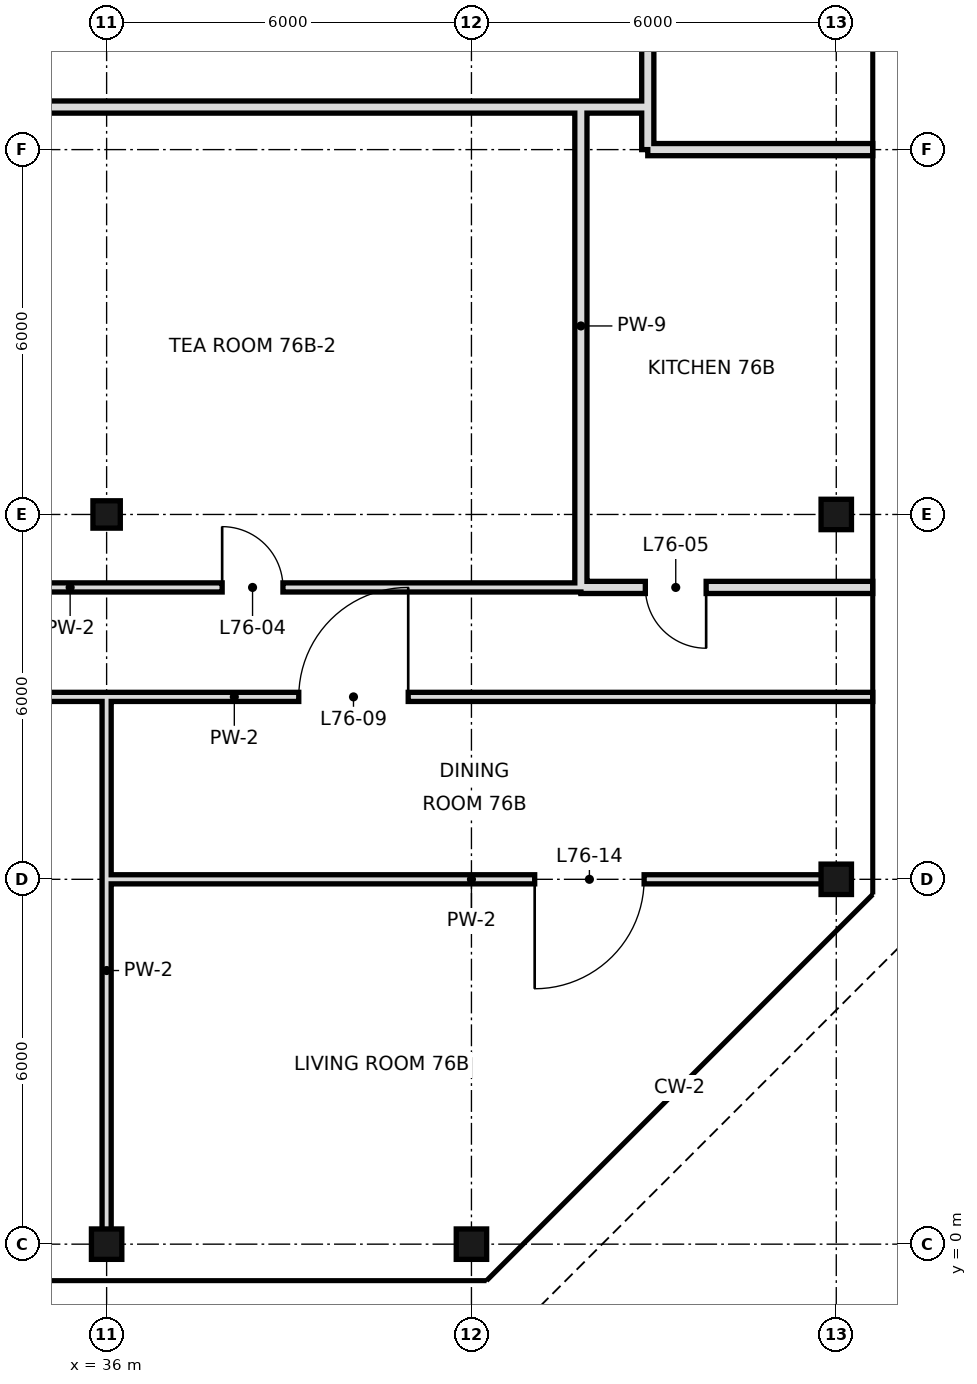
"""IFC4 building model, lengths in metres.
Left out: names, types, materials, properties, quantities, classifications, styles, units other than length and angle.
Written with IfcOpenShell. Run it as: python <this file> out.ifc"""

import sys

from ifc_helpers import new_model, si_unit, direction, frame, frame_2d, origin, origin_2d, place, context, subcontext, project, spatial, rectangle, hollow_rectangle, extrude, element, fill, save


model = new_model("IFC4")
c1 = context("Model", 3, precision=1e-05, world=origin(), true_north=direction((0.0, 1.0)))
c2 = subcontext(c1, "Body", "Model", "MODEL_VIEW")
j1 = project(units=[si_unit("LENGTHUNIT", "METRE"), si_unit("PLANEANGLEUNIT", "RADIAN")], contexts=[c1])
p1 = place(None, origin())
s1 = spatial("IfcSite", under=j1, at=p1, CompositionType="ELEMENT")
p2 = place(p1, origin())
s2 = spatial("IfcBuilding", under=s1, at=p2, CompositionType="ELEMENT")
p3 = place(p2, frame((0.0, 0.0, 319.6)))
s3 = spatial("IfcBuildingStorey", under=s2, at=p3, CompositionType="ELEMENT", Elevation=319.6)
p4 = place(p3, frame((36.0, 0.0, 0.0), z_axis=(0.0, 0.0, 1.0), x_axis=(1.0, 0.0, 0.0)))
e1 = element("IfcColumn", 1, at=p4, inside=s3, PredefinedType="COLUMN", context=c2, shape_type="SweptSolid", body=[
    extrude(hollow_rectangle(XDim=0.5, YDim=0.5, WallThickness=0.025, at=origin_2d()), origin(), (0.0, 0.0, 1.0), 3.6),
])
p5 = place(p3, frame((36.0, 12.0, 0.0), z_axis=(0.0, 0.0, 1.0), x_axis=(1.0, 0.0, 0.0)))
e2 = element("IfcColumn", 2, at=p5, inside=s3, PredefinedType="COLUMN", context=c2, shape_type="SweptSolid", body=[
    extrude(hollow_rectangle(XDim=0.45, YDim=0.45, WallThickness=0.022, at=origin_2d()), origin(), (0.0, 0.0, 1.0), 3.6),
])
for number, where, z_axis, x_axis in (
    (3, (42.0, 0.0, 0.0), (0.0, 0.0, 1.0), (1.0, 0.0, 0.0)),
    (4, (48.0, 6.0, 0.0), (0.0, 0.0, 1.0), (1.0, 0.0, 0.0)),
    (5, (48.0, 12.0, 0.0), (0.0, 0.0, 1.0), (1.0, 0.0, 0.0)),
):
    element("IfcColumn", number, at=place(p3, frame(where, z_axis=z_axis, x_axis=x_axis)), inside=s3, PredefinedType="COLUMN", context=c2, shape_type="SweptSolid", body=[
        extrude(hollow_rectangle(XDim=0.5, YDim=0.5, WallThickness=0.025, at=origin_2d()), origin(), (0.0, 0.0, 1.0), 3.6),
    ])
p6 = place(p3, frame((36.0, 0.0, 0.0), z_axis=(0.0, 0.0, 1.0), x_axis=(0.0, 1.0, 0.0)))
e6 = element("IfcWall", 6, at=p6, inside=s3, PredefinedType="PARTITIONING", context=c2, shape_type="SweptSolid", body=[
    extrude(rectangle(XDim=9.0, YDim=0.15, at=frame_2d((4.5, 0.0))), origin(), (0.0, 0.0, 1.0), 2.72),
])
p7 = place(p3, frame((43.8, 10.8, 0.0), z_axis=(0.0, 0.0, 1.0), x_axis=(0.0, 1.0, 0.0)))
e7 = element("IfcWall", 7, at=p7, inside=s3, PredefinedType="SOLIDWALL", context=c2, shape_type="SweptSolid", body=[
    extrude(rectangle(XDim=7.9, YDim=0.2, at=frame_2d((3.95, 0.0))), origin(), (0.0, 0.0, 1.0), 2.72),
])
p8 = place(p3, frame((44.9, 18.7, 0.0), z_axis=(0.0, 0.0, 1.0), x_axis=(0.0, 1.0, 0.0)))
e8 = element("IfcWall", 8, at=p8, inside=s3, PredefinedType="SOLIDWALL", context=c2, shape_type="SweptSolid", body=[
    extrude(rectangle(XDim=27.249, YDim=0.2, at=frame_2d((13.625, 0.0))), origin(), (0.0, 0.0, 1.0), 2.97),
])
p9 = place(p8, frame((7.66, 0.0, 0.0)))
e9 = element("IfcOpeningElement", 9, at=p9, cuts=e8, PredefinedType="OPENING", context=c2, shape_type="SweptSolid", body=[
    extrude(rectangle(XDim=1.2, YDim=2.4, at=frame_2d((0.6, 1.2))), frame((0.0, 0.11, 0.0), z_axis=(0.0, -1.0, 0.0), x_axis=(1.0, 0.0, 0.0)), (0.0, 0.0, 1.0), 0.22),
])
p10 = place(p3, frame((44.9, 18.0, 0.0), z_axis=(0.0, 0.0, 1.0), x_axis=(0.0, 1.0, 0.0)))
e10 = element("IfcWall", 10, at=p10, inside=s3, PredefinedType="SOLIDWALL", context=c2, shape_type="SweptSolid", body=[
    extrude(rectangle(XDim=0.7, YDim=0.2, at=frame_2d((0.35, 0.0))), origin(), (0.0, 0.0, 1.0), 2.97),
])
p11 = place(p3, frame((43.8, 10.8, 0.0), z_axis=(0.0, 0.0, 1.0), x_axis=(1.0, 0.0, 0.0)))
e11 = element("IfcWall", 11, at=p11, inside=s3, PredefinedType="SOLIDWALL", context=c2, shape_type="SweptSolid", body=[
    extrude(rectangle(XDim=4.8, YDim=0.2, at=frame_2d((2.4, 0.0))), origin(), (0.0, 0.0, 1.0), 2.97),
])
p12 = place(p11, frame((1.06, 0.0, 0.0)))
e12 = element("IfcOpeningElement", 12, at=p12, cuts=e11, PredefinedType="OPENING", context=c2, shape_type="SweptSolid", body=[
    extrude(rectangle(XDim=1.0, YDim=2.4, at=frame_2d((0.5, 1.2))), frame((0.0, 0.11, 0.0), z_axis=(0.0, -1.0, 0.0), x_axis=(1.0, 0.0, 0.0)), (0.0, 0.0, 1.0), 0.22),
])
p13 = place(p3, frame((27.0, 10.8, 0.0), z_axis=(0.0, 0.0, 1.0), x_axis=(1.0, 0.0, 0.0)))
e13 = element("IfcWall", 13, at=p13, inside=s3, PredefinedType="PARTITIONING", context=c2, shape_type="SweptSolid", body=[
    extrude(rectangle(XDim=16.8, YDim=0.15, at=frame_2d((8.4, 0.0))), origin(), (0.0, 0.0, 1.0), 3.42),
])
p14 = place(p13, frame((1.6, 0.0, 0.0)))
e14 = element("IfcOpeningElement", 14, at=p14, cuts=e13, PredefinedType="OPENING", context=c2, shape_type="SweptSolid", body=[
    extrude(rectangle(XDim=1.0, YDim=2.4, at=frame_2d((0.5, 1.2))), frame((0.0, 0.085, 0.0), z_axis=(0.0, -1.0, 0.0), x_axis=(1.0, 0.0, 0.0)), (0.0, 0.0, 1.0), 0.17),
])
p15 = place(p13, frame((10.9, 0.0, 0.0)))
e15 = element("IfcOpeningElement", 15, at=p15, cuts=e13, PredefinedType="OPENING", context=c2, shape_type="SweptSolid", body=[
    extrude(rectangle(XDim=1.0, YDim=2.4, at=frame_2d((0.5, 1.2))), frame((0.0, 0.085, 0.0), z_axis=(0.0, -1.0, 0.0), x_axis=(1.0, 0.0, 0.0)), (0.0, 0.0, 1.0), 0.17),
])
p16 = place(p3, frame((44.9, 18.0, 0.0), z_axis=(0.0, 0.0, 1.0), x_axis=(1.0, 0.0, 0.0)))
e16 = element("IfcWall", 16, at=p16, inside=s3, PredefinedType="SOLIDWALL", context=c2, shape_type="SweptSolid", body=[
    extrude(rectangle(XDim=3.7, YDim=0.2, at=frame_2d((1.85, 0.0))), origin(), (0.0, 0.0, 1.0), 2.72),
])
p17 = place(p3, frame((3.1, 18.7, 0.0), z_axis=(0.0, 0.0, 1.0), x_axis=(1.0, 0.0, 0.0)))
e17 = element("IfcWall", 17, at=p17, inside=s3, PredefinedType="SOLIDWALL", context=c2, shape_type="SweptSolid", body=[
    extrude(rectangle(XDim=40.7, YDim=0.2, at=frame_2d((20.35, 0.0))), origin(), (0.0, 0.0, 1.0), 2.72),
])
p18 = place(p17, frame((25.44, 0.0, 0.0)))
e18 = element("IfcOpeningElement", 18, at=p18, cuts=e17, PredefinedType="OPENING", context=c2, shape_type="SweptSolid", body=[
    extrude(rectangle(XDim=1.2, YDim=2.4, at=frame_2d((0.6, 1.2))), frame((0.0, 0.11, 0.0), z_axis=(0.0, -1.0, 0.0), x_axis=(1.0, 0.0, 0.0)), (0.0, 0.0, 1.0), 0.22),
])
p19 = place(p17, frame((6.55, 0.0, 0.0)))
e19 = element("IfcOpeningElement", 19, at=p19, cuts=e17, PredefinedType="OPENING", context=c2, shape_type="SweptSolid", body=[
    extrude(rectangle(XDim=1.8, YDim=2.4, at=frame_2d((0.9, 1.2))), frame((0.0, 0.11, 0.0), z_axis=(0.0, -1.0, 0.0), x_axis=(1.0, 0.0, 0.0)), (0.0, 0.0, 1.0), 0.22),
])
p20 = place(p3, frame((43.8, 18.7, 0.0), z_axis=(0.0, 0.0, 1.0), x_axis=(1.0, 0.0, 0.0)))
e20 = element("IfcWall", 20, at=p20, inside=s3, PredefinedType="SOLIDWALL", context=c2, shape_type="SweptSolid", body=[
    extrude(rectangle(XDim=1.1, YDim=0.2, at=frame_2d((0.55, 0.0))), origin(), (0.0, 0.0, 1.0), 3.42),
])
p21 = place(p3, frame((36.0, 6.0, 0.0), z_axis=(0.0, 0.0, 1.0), x_axis=(1.0, 0.0, 0.0)))
e21 = element("IfcWall", 21, at=p21, inside=s3, PredefinedType="PARTITIONING", context=c2, shape_type="SweptSolid", body=[
    extrude(rectangle(XDim=12.0, YDim=0.15, at=frame_2d((6.0, 0.0))), origin(), (0.0, 0.0, 1.0), 2.97),
])
p22 = place(p21, frame((7.04, 0.0, 0.0)))
e22 = element("IfcOpeningElement", 22, at=p22, cuts=e21, PredefinedType="OPENING", context=c2, shape_type="SweptSolid", body=[
    extrude(rectangle(XDim=1.8, YDim=2.4, at=frame_2d((0.9, 1.2))), frame((0.0, 0.085, 0.0), z_axis=(0.0, -1.0, 0.0), x_axis=(1.0, 0.0, 0.0)), (0.0, 0.0, 1.0), 0.17),
])
p23 = place(p3, frame((27.6, 9.0, 0.0), z_axis=(0.0, 0.0, 1.0), x_axis=(1.0, 0.0, 0.0)))
e23 = element("IfcWall", 23, at=p23, inside=s3, PredefinedType="PARTITIONING", context=c2, shape_type="SweptSolid", body=[
    extrude(rectangle(XDim=21.0, YDim=0.15, at=frame_2d((10.5, 0.0))), origin(), (0.0, 0.0, 1.0), 3.42),
])
p24 = place(p23, frame((0.52, 0.0, 0.0)))
e24 = element("IfcOpeningElement", 24, at=p24, cuts=e23, PredefinedType="OPENING", context=c2, shape_type="SweptSolid", body=[
    extrude(rectangle(XDim=1.0, YDim=2.4, at=frame_2d((0.5, 1.2))), frame((0.0, 0.085, 0.0), z_axis=(0.0, -1.0, 0.0), x_axis=(1.0, 0.0, 0.0)), (0.0, 0.0, 1.0), 0.17),
])
p25 = place(p23, frame((4.0, 0.0, 0.0)))
e25 = element("IfcOpeningElement", 25, at=p25, cuts=e23, PredefinedType="OPENING", context=c2, shape_type="SweptSolid", body=[
    extrude(rectangle(XDim=1.0, YDim=2.4, at=frame_2d((0.5, 1.2))), frame((0.0, 0.085, 0.0), z_axis=(0.0, -1.0, 0.0), x_axis=(1.0, 0.0, 0.0)), (0.0, 0.0, 1.0), 0.17),
])
p26 = place(p23, frame((11.56, 0.0, 0.0)))
e26 = element("IfcOpeningElement", 26, at=p26, cuts=e23, PredefinedType="OPENING", context=c2, shape_type="SweptSolid", body=[
    extrude(rectangle(XDim=1.8, YDim=2.4, at=frame_2d((0.9, 1.2))), frame((0.0, 0.085, 0.0), z_axis=(0.0, -1.0, 0.0), x_axis=(1.0, 0.0, 0.0)), (0.0, 0.0, 1.0), 0.17),
])
p27 = place(p15, origin())
e27 = element("IfcDoor", 27, at=p27, inside=s3, OperationType="SINGLE_SWING_LEFT", PredefinedType="DOOR", context=c2, shape_type="SweptSolid", body=[
    extrude(rectangle(XDim=1.0, YDim=2.4, at=frame_2d((0.5, 1.2))), frame((0.0, 0.025, 0.0), z_axis=(0.0, -1.0, 0.0), x_axis=(1.0, 0.0, 0.0)), (0.0, 0.0, 1.0), 0.05),
])
fill(e15, e27)
p28 = place(p12, origin())
e28 = element("IfcDoor", 28, at=p28, inside=s3, OperationType="SINGLE_SWING_RIGHT", PredefinedType="DOOR", context=c2, shape_type="SweptSolid", body=[
    extrude(rectangle(XDim=1.0, YDim=2.4, at=frame_2d((0.5, 1.2))), frame((0.0, 0.025, 0.0), z_axis=(0.0, -1.0, 0.0), x_axis=(1.0, 0.0, 0.0)), (0.0, 0.0, 1.0), 0.05),
])
fill(e12, e28)
p29 = place(p26, frame((1.8, 0.0, 0.0), z_axis=(0.0, 0.0, 1.0), x_axis=(-1.0, 0.0, 0.0)))
e29 = element("IfcDoor", 29, at=p29, inside=s3, OperationType="SINGLE_SWING_LEFT", PredefinedType="DOOR", context=c2, shape_type="SweptSolid", body=[
    extrude(rectangle(XDim=1.8, YDim=2.4, at=frame_2d((0.9, 1.2))), frame((0.0, 0.025, 0.0), z_axis=(0.0, -1.0, 0.0), x_axis=(1.0, 0.0, 0.0)), (0.0, 0.0, 1.0), 0.05),
])
fill(e26, e29)
p30 = place(p22, frame((1.8, 0.0, 0.0), z_axis=(0.0, 0.0, 1.0), x_axis=(-1.0, 0.0, 0.0)))
e30 = element("IfcDoor", 30, at=p30, inside=s3, OperationType="SINGLE_SWING_RIGHT", PredefinedType="DOOR", context=c2, shape_type="SweptSolid", body=[
    extrude(rectangle(XDim=1.8, YDim=2.4, at=frame_2d((0.9, 1.2))), frame((0.0, 0.025, 0.0), z_axis=(0.0, -1.0, 0.0), x_axis=(1.0, 0.0, 0.0)), (0.0, 0.0, 1.0), 0.05),
])
fill(e22, e30)
save(model, sys.argv[1])
